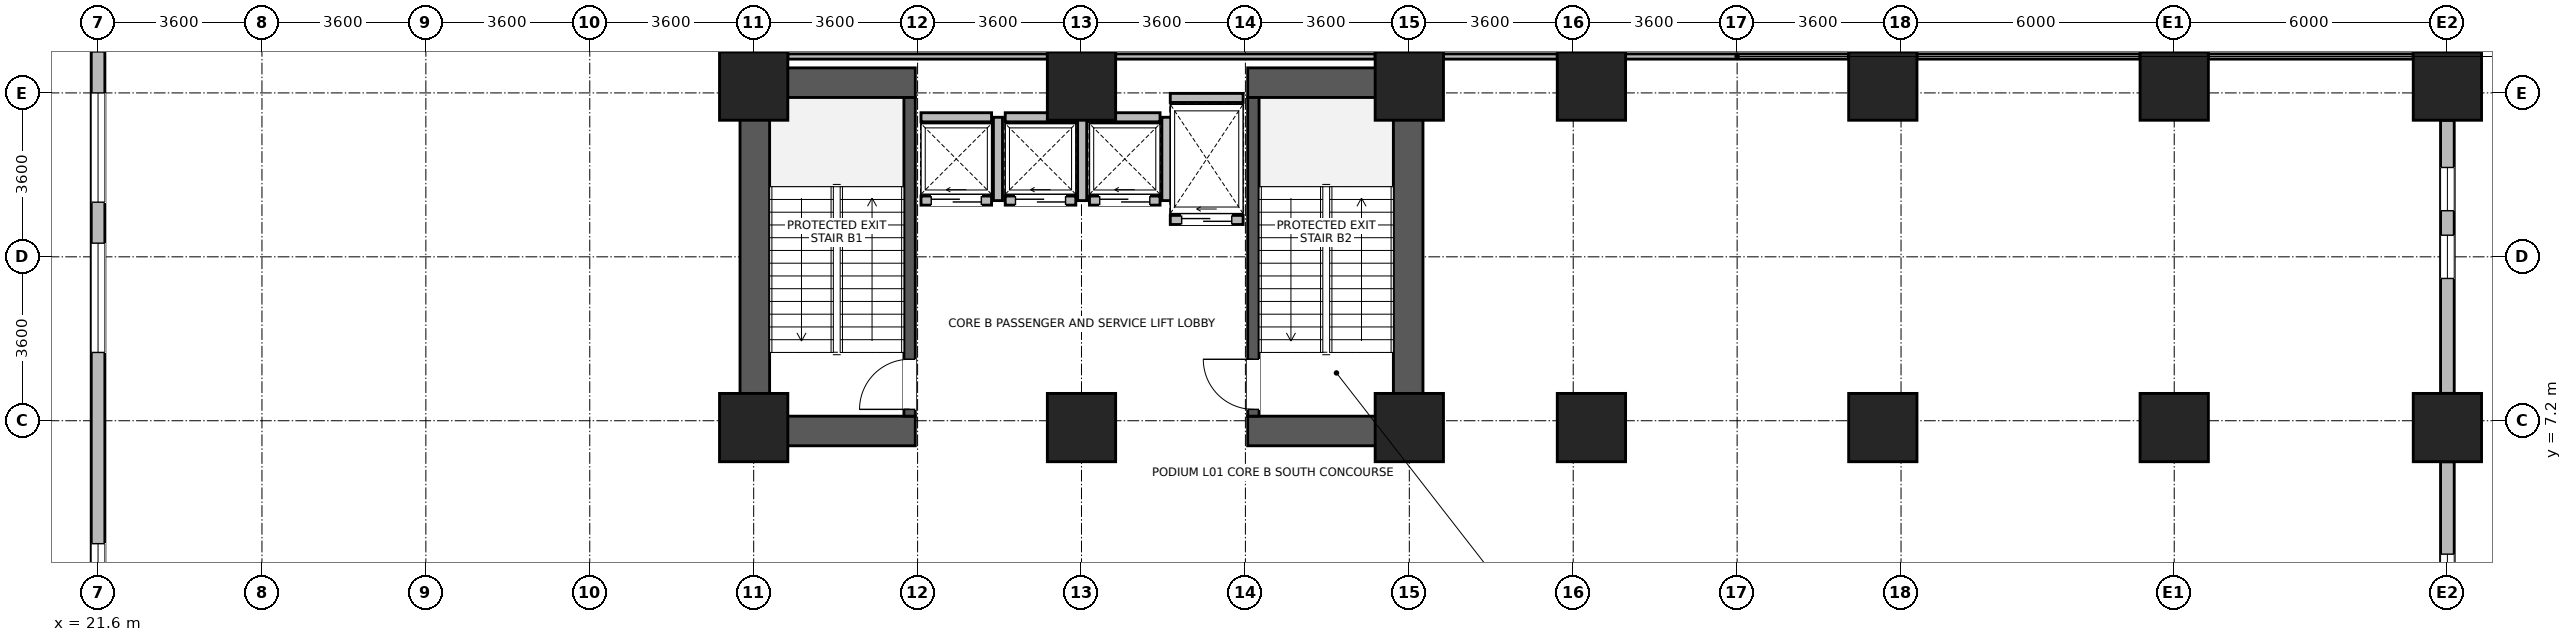
"""IFC4 building model, lengths in metres.
Left out: names, types, materials, properties, quantities, classifications, styles, units other than length and angle.
Written with IfcOpenShell. Run it as: python <this file> out.ifc"""

import sys

from ifc_helpers import new_model, si_unit, direction, frame, frame_2d, origin, origin_2d, place, context, subcontext, project, spatial, rectangle, extrude, source, transform, mapped, element, fill, save


model = new_model("IFC4")
c1 = context("Model", 3, precision=1e-05, world=origin(), true_north=direction((0.0, 1.0)))
c2 = subcontext(c1, "Body", "Model", "MODEL_VIEW")
j1 = project(units=[si_unit("LENGTHUNIT", "METRE"), si_unit("PLANEANGLEUNIT", "RADIAN")], contexts=[c1])
p1 = place(None, origin())
s1 = spatial("IfcSite", under=j1, at=p1, CompositionType="ELEMENT")
p2 = place(p1, origin())
s2 = spatial("IfcBuilding", under=s1, at=p2, CompositionType="ELEMENT")
p3 = place(p2, frame((0.0, 0.0, 5.4)))
s3 = spatial("IfcBuildingStorey", under=s2, at=p3, CompositionType="ELEMENT", Elevation=5.4)
for number, where, z_axis, x_axis in (
    (1, (36.025, 6.65, 0.0), (0.0, 0.0, 1.0), (0.0, 1.0, 0.0)),
    (2, (50.375, 6.65, 0.0), (0.0, 0.0, 1.0), (0.0, 1.0, 0.0)),
):
    element("IfcWall", number, at=place(p3, frame(where, z_axis=z_axis, x_axis=x_axis)), inside=s3, PredefinedType="SHEAR", context=c2, shape_type="SweptSolid", body=[
        extrude(rectangle(XDim=8.3, YDim=0.65, at=frame_2d((4.15, 0.0))), origin(), (0.0, 0.0, 1.0), 4.52),
    ])
for number, where, z_axis, x_axis in (
    (3, (36.35, 6.975, 0.0), (0.0, 0.0, 1.0), (1.0, 0.0, 0.0)),
    (4, (46.85, 6.975, 0.0), (0.0, 0.0, 1.0), (1.0, 0.0, 0.0)),
    (5, (36.35, 14.625, 0.0), (0.0, 0.0, 1.0), (1.0, 0.0, 0.0)),
    (6, (46.85, 14.625, 0.0), (0.0, 0.0, 1.0), (1.0, 0.0, 0.0)),
):
    element("IfcWall", number, at=place(p3, frame(where, z_axis=z_axis, x_axis=x_axis)), inside=s3, PredefinedType="SHEAR", context=c2, shape_type="SweptSolid", body=[
        extrude(rectangle(XDim=3.2, YDim=0.65, at=frame_2d((1.6, 0.0))), origin(), (0.0, 0.0, 1.0), 4.52),
    ])
p4 = place(p3, frame((39.425, 7.3, 0.0), z_axis=(0.0, 0.0, 1.0), x_axis=(0.0, 1.0, 0.0)))
e7 = element("IfcWall", 7, at=p4, inside=s3, PredefinedType="SHEAR", context=c2, shape_type="SweptSolid", body=[
    extrude(rectangle(XDim=7.0, YDim=0.25, at=frame_2d((3.5, 0.0))), origin(), (0.0, 0.0, 1.0), 4.52),
])
p5 = place(p4, frame((0.15, 0.0, 0.0)))
e8 = element("IfcOpeningElement", 8, at=p5, cuts=e7, PredefinedType="OPENING", context=c2, shape_type="SweptSolid", body=[
    extrude(rectangle(XDim=1.1, YDim=2.08, at=frame_2d((0.55, 1.04))), frame((0.0, 0.135, 0.0), z_axis=(0.0, -1.0, 0.0), x_axis=(1.0, 0.0, 0.0)), (0.0, 0.0, 1.0), 0.27),
])
p6 = place(p3, frame((46.975, 7.3, 0.0), z_axis=(0.0, 0.0, 1.0), x_axis=(0.0, 1.0, 0.0)))
e9 = element("IfcWall", 9, at=p6, inside=s3, PredefinedType="SHEAR", context=c2, shape_type="SweptSolid", body=[
    extrude(rectangle(XDim=7.0, YDim=0.25, at=frame_2d((3.5, 0.0))), origin(), (0.0, 0.0, 1.0), 4.52),
])
p7 = place(p6, frame((0.15, 0.0, 0.0)))
e10 = element("IfcOpeningElement", 10, at=p7, cuts=e9, PredefinedType="OPENING", context=c2, shape_type="SweptSolid", body=[
    extrude(rectangle(XDim=1.1, YDim=2.08, at=frame_2d((0.55, 1.04))), frame((0.0, 0.135, 0.0), z_axis=(0.0, -1.0, 0.0), x_axis=(1.0, 0.0, 0.0)), (0.0, 0.0, 1.0), 0.27),
])
m1 = source(origin(), c2, "Body", "SweptSolid", [
    extrude(rectangle(XDim=1.5, YDim=1.5, at=origin_2d()), origin(), (0.0, 0.0, 1.0), 4.8),
])
for number, where, z_axis, x_axis in (
    (11, (36.0, 7.05, 0.0), (0.0, 0.0, 1.0), (1.0, 0.0, 0.0)),
    (12, (36.0, 14.55, 0.0), (0.0, 0.0, 1.0), (1.0, 0.0, 0.0)),
    (13, (43.2, 7.05, 0.0), (0.0, 0.0, 1.0), (1.0, 0.0, 0.0)),
    (14, (43.2, 14.55, 0.0), (0.0, 0.0, 1.0), (1.0, 0.0, 0.0)),
    (15, (50.4, 7.05, 0.0), (0.0, 0.0, 1.0), (1.0, 0.0, 0.0)),
    (16, (50.4, 14.55, 0.0), (0.0, 0.0, 1.0), (1.0, 0.0, 0.0)),
    (17, (54.4, 7.05, 0.0), (0.0, 0.0, 1.0), (1.0, 0.0, 0.0)),
    (18, (54.4, 14.55, 0.0), (0.0, 0.0, 1.0), (1.0, 0.0, 0.0)),
    (19, (60.8, 14.55, 0.0), (0.0, 0.0, 1.0), (1.0, 0.0, 0.0)),
    (20, (60.8, 7.05, 0.0), (0.0, 0.0, 1.0), (1.0, 0.0, 0.0)),
    (21, (67.2, 7.05, 0.0), (0.0, 0.0, 1.0), (1.0, 0.0, 0.0)),
    (22, (67.2, 14.55, 0.0), (0.0, 0.0, 1.0), (1.0, 0.0, 0.0)),
    (23, (73.2, 7.05, 0.0), (0.0, 0.0, 1.0), (1.0, 0.0, 0.0)),
    (24, (73.2, 14.55, 0.0), (0.0, 0.0, 1.0), (1.0, 0.0, 0.0)),
):
    element("IfcColumn", number, at=place(p3, frame(where, z_axis=z_axis, x_axis=x_axis)), inside=s3, PredefinedType="COLUMN", context=c2, shape_type="MappedRepresentation", body=[
        mapped(m1, transform((0.0, 0.0, 0.0), x_axis=(1.0, 0.0, 0.0), y_axis=(0.0, 1.0, 0.0), z_axis=(0.0, 0.0, 1.0), scale=1.0)),
    ])
p8 = place(p3, frame((73.2, 6.299, 0.0), z_axis=(0.0, 0.0, 1.0), x_axis=(0.0, -1.0, 0.0)))
e25 = element("IfcWall", 25, at=p8, inside=s3, PredefinedType="STANDARD", context=c2, shape_type="SweptSolid", body=[
    extrude(rectangle(XDim=3.348, YDim=0.3, at=frame_2d((1.674, 0.0))), origin(), (0.0, 0.0, 1.0), 3.9),
])
p9 = place(p8, frame((2.029, 0.0, 0.9)))
e26 = element("IfcOpeningElement", 26, at=p9, cuts=e25, PredefinedType="OPENING", context=c2, shape_type="SweptSolid", body=[
    extrude(rectangle(XDim=0.95, YDim=1.75, at=frame_2d((0.475, 0.875))), frame((0.0, 0.16, 0.0), z_axis=(0.0, -1.0, 0.0), x_axis=(1.0, 0.0, 0.0)), (0.0, 0.0, 1.0), 0.32),
])
p10 = place(p3, frame((73.2, 13.799, 0.0), z_axis=(0.0, 0.0, 1.0), x_axis=(0.0, -1.0, 0.0)))
e27 = element("IfcWall", 27, at=p10, inside=s3, PredefinedType="STANDARD", context=c2, shape_type="SweptSolid", body=[
    extrude(rectangle(XDim=5.998, YDim=0.3, at=frame_2d((2.999, 0.0))), origin(), (0.0, 0.0, 1.0), 3.9),
])
p11 = place(p10, frame((2.524, 0.0, 0.9)))
e28 = element("IfcOpeningElement", 28, at=p11, cuts=e27, PredefinedType="OPENING", context=c2, shape_type="SweptSolid", body=[
    extrude(rectangle(XDim=0.95, YDim=1.75, at=frame_2d((0.475, 0.875))), frame((0.0, 0.16, 0.0), z_axis=(0.0, -1.0, 0.0), x_axis=(1.0, 0.0, 0.0)), (0.0, 0.0, 1.0), 0.32),
])
p12 = place(p10, frame((1.037, 0.0, 0.9)))
e29 = element("IfcOpeningElement", 29, at=p12, cuts=e27, PredefinedType="OPENING", context=c2, shape_type="SweptSolid", body=[
    extrude(rectangle(XDim=0.95, YDim=1.75, at=frame_2d((0.475, 0.875))), frame((0.0, 0.16, 0.0), z_axis=(0.0, -1.0, 0.0), x_axis=(1.0, 0.0, 0.0)), (0.0, 0.0, 1.0), 0.32),
])
p13 = place(p3, frame((21.6, 1.65, 0.0), z_axis=(0.0, 0.0, 1.0), x_axis=(0.0, 1.0, 0.0)))
e30 = element("IfcWall", 30, at=p13, inside=s3, PredefinedType="STANDARD", context=c2, shape_type="SweptSolid", body=[
    extrude(rectangle(XDim=16.5, YDim=0.3, at=frame_2d((8.25, 0.0))), origin(), (0.0, 0.0, 1.0), 4.5),
])
p14 = place(p13, frame((0.45, 0.0, 0.9)))
e31 = element("IfcOpeningElement", 31, at=p14, cuts=e30, PredefinedType="OPENING", context=c2, shape_type="SweptSolid", body=[
    extrude(rectangle(XDim=2.4, YDim=2.5, at=frame_2d((1.2, 1.25))), frame((0.0, 0.16, 0.0), z_axis=(0.0, -1.0, 0.0), x_axis=(1.0, 0.0, 0.0)), (0.0, 0.0, 1.0), 0.32),
])
p15 = place(p13, frame((7.05, 0.0, 0.9)))
e32 = element("IfcOpeningElement", 32, at=p15, cuts=e30, PredefinedType="OPENING", context=c2, shape_type="SweptSolid", body=[
    extrude(rectangle(XDim=2.4, YDim=2.5, at=frame_2d((1.2, 1.25))), frame((0.0, 0.16, 0.0), z_axis=(0.0, -1.0, 0.0), x_axis=(1.0, 0.0, 0.0)), (0.0, 0.0, 1.0), 0.32),
])
p16 = place(p13, frame((10.35, 0.0, 0.9)))
e33 = element("IfcOpeningElement", 33, at=p16, cuts=e30, PredefinedType="OPENING", context=c2, shape_type="SweptSolid", body=[
    extrude(rectangle(XDim=2.4, YDim=2.5, at=frame_2d((1.2, 1.25))), frame((0.0, 0.16, 0.0), z_axis=(0.0, -1.0, 0.0), x_axis=(1.0, 0.0, 0.0)), (0.0, 0.0, 1.0), 0.32),
])
p17 = place(p13, frame((13.65, 0.0, 0.9)))
e34 = element("IfcOpeningElement", 34, at=p17, cuts=e30, PredefinedType="OPENING", context=c2, shape_type="SweptSolid", body=[
    extrude(rectangle(XDim=2.4, YDim=2.5, at=frame_2d((1.2, 1.25))), frame((0.0, 0.16, 0.0), z_axis=(0.0, -1.0, 0.0), x_axis=(1.0, 0.0, 0.0)), (0.0, 0.0, 1.0), 0.32),
])
p18 = place(p3, frame((39.675, 12.035, 0.0), z_axis=(0.0, 0.0, 1.0), x_axis=(1.0, 0.0, 0.0)))
e35 = element("IfcWall", 35, at=p18, inside=s3, PredefinedType="PARTITIONING", context=c2, shape_type="SweptSolid", body=[
    extrude(rectangle(XDim=1.55, YDim=0.2, at=frame_2d((0.775, 0.0))), origin(), (0.0, 0.0, 1.0), 4.5),
])
p19 = place(p18, frame((0.225, 0.0, 0.0)))
e36 = element("IfcOpeningElement", 36, at=p19, cuts=e35, PredefinedType="OPENING", context=c2, shape_type="SweptSolid", body=[
    extrude(rectangle(XDim=1.1, YDim=2.12, at=frame_2d((0.55, 1.06))), frame((0.0, 0.11, 0.0), z_axis=(0.0, -1.0, 0.0), x_axis=(1.0, 0.0, 0.0)), (0.0, 0.0, 1.0), 0.22),
])
p20 = place(p3, frame((39.675, 13.865, 0.0), z_axis=(0.0, 0.0, 1.0), x_axis=(1.0, 0.0, 0.0)))
e37 = element("IfcWall", 37, at=p20, inside=s3, PredefinedType="PARTITIONING", context=c2, shape_type="SweptSolid", body=[
    extrude(rectangle(XDim=1.55, YDim=0.2, at=frame_2d((0.775, 0.0))), origin(), (0.0, 0.0, 1.0), 4.5),
])
p21 = place(p3, frame((41.365, 12.035, 0.0), z_axis=(0.0, 0.0, 1.0), x_axis=(0.0, 1.0, 0.0)))
e38 = element("IfcWall", 38, at=p21, inside=s3, PredefinedType="PARTITIONING", context=c2, shape_type="SweptSolid", body=[
    extrude(rectangle(XDim=1.83, YDim=0.2, at=frame_2d((0.915, 0.0))), origin(), (0.0, 0.0, 1.0), 4.5),
])
p22 = place(p3, frame((41.525, 12.035, 0.0), z_axis=(0.0, 0.0, 1.0), x_axis=(1.0, 0.0, 0.0)))
e39 = element("IfcWall", 39, at=p22, inside=s3, PredefinedType="PARTITIONING", context=c2, shape_type="SweptSolid", body=[
    extrude(rectangle(XDim=1.55, YDim=0.2, at=frame_2d((0.775, 0.0))), origin(), (0.0, 0.0, 1.0), 4.5),
])
p23 = place(p22, frame((0.225, 0.0, 0.0)))
e40 = element("IfcOpeningElement", 40, at=p23, cuts=e39, PredefinedType="OPENING", context=c2, shape_type="SweptSolid", body=[
    extrude(rectangle(XDim=1.1, YDim=2.12, at=frame_2d((0.55, 1.06))), frame((0.0, 0.11, 0.0), z_axis=(0.0, -1.0, 0.0), x_axis=(1.0, 0.0, 0.0)), (0.0, 0.0, 1.0), 0.22),
])
p24 = place(p3, frame((41.525, 13.865, 0.0), z_axis=(0.0, 0.0, 1.0), x_axis=(1.0, 0.0, 0.0)))
e41 = element("IfcWall", 41, at=p24, inside=s3, PredefinedType="PARTITIONING", context=c2, shape_type="SweptSolid", body=[
    extrude(rectangle(XDim=1.55, YDim=0.2, at=frame_2d((0.775, 0.0))), origin(), (0.0, 0.0, 1.0), 4.5),
])
p25 = place(p3, frame((43.215, 12.035, 0.0), z_axis=(0.0, 0.0, 1.0), x_axis=(0.0, 1.0, 0.0)))
e42 = element("IfcWall", 42, at=p25, inside=s3, PredefinedType="PARTITIONING", context=c2, shape_type="SweptSolid", body=[
    extrude(rectangle(XDim=1.83, YDim=0.2, at=frame_2d((0.915, 0.0))), origin(), (0.0, 0.0, 1.0), 4.5),
])
p26 = place(p3, frame((43.375, 12.035, 0.0), z_axis=(0.0, 0.0, 1.0), x_axis=(1.0, 0.0, 0.0)))
e43 = element("IfcWall", 43, at=p26, inside=s3, PredefinedType="PARTITIONING", context=c2, shape_type="SweptSolid", body=[
    extrude(rectangle(XDim=1.55, YDim=0.2, at=frame_2d((0.775, 0.0))), origin(), (0.0, 0.0, 1.0), 4.5),
])
p27 = place(p26, frame((0.225, 0.0, 0.0)))
e44 = element("IfcOpeningElement", 44, at=p27, cuts=e43, PredefinedType="OPENING", context=c2, shape_type="SweptSolid", body=[
    extrude(rectangle(XDim=1.1, YDim=2.12, at=frame_2d((0.55, 1.06))), frame((0.0, 0.11, 0.0), z_axis=(0.0, -1.0, 0.0), x_axis=(1.0, 0.0, 0.0)), (0.0, 0.0, 1.0), 0.22),
])
p28 = place(p3, frame((43.375, 13.865, 0.0), z_axis=(0.0, 0.0, 1.0), x_axis=(1.0, 0.0, 0.0)))
e45 = element("IfcWall", 45, at=p28, inside=s3, PredefinedType="PARTITIONING", context=c2, shape_type="SweptSolid", body=[
    extrude(rectangle(XDim=1.55, YDim=0.2, at=frame_2d((0.775, 0.0))), origin(), (0.0, 0.0, 1.0), 4.5),
])
p29 = place(p3, frame((45.065, 12.035, 0.0), z_axis=(0.0, 0.0, 1.0), x_axis=(0.0, 1.0, 0.0)))
e46 = element("IfcWall", 46, at=p29, inside=s3, PredefinedType="PARTITIONING", context=c2, shape_type="SweptSolid", body=[
    extrude(rectangle(XDim=1.83, YDim=0.2, at=frame_2d((0.915, 0.0))), origin(), (0.0, 0.0, 1.0), 4.5),
])
p30 = place(p3, frame((45.15, 11.61, 0.0), z_axis=(0.0, 0.0, 1.0), x_axis=(1.0, 0.0, 0.0)))
e47 = element("IfcWall", 47, at=p30, inside=s3, PredefinedType="PARTITIONING", context=c2, shape_type="SweptSolid", body=[
    extrude(rectangle(XDim=1.6, YDim=0.2, at=frame_2d((0.8, 0.0))), origin(), (0.0, 0.0, 1.0), 4.5),
])
p31 = place(p30, frame((0.25, 0.0, 0.0)))
e48 = element("IfcOpeningElement", 48, at=p31, cuts=e47, PredefinedType="OPENING", context=c2, shape_type="SweptSolid", body=[
    extrude(rectangle(XDim=1.1, YDim=2.12, at=frame_2d((0.55, 1.06))), frame((0.0, 0.11, 0.0), z_axis=(0.0, -1.0, 0.0), x_axis=(1.0, 0.0, 0.0)), (0.0, 0.0, 1.0), 0.22),
])
p32 = place(p3, frame((45.15, 14.29, 0.0), z_axis=(0.0, 0.0, 1.0), x_axis=(1.0, 0.0, 0.0)))
e49 = element("IfcWall", 49, at=p32, inside=s3, PredefinedType="PARTITIONING", context=c2, shape_type="SweptSolid", body=[
    extrude(rectangle(XDim=1.6, YDim=0.2, at=frame_2d((0.8, 0.0))), origin(), (0.0, 0.0, 1.0), 3.3),
])
p33 = place(p3, frame((35.4, 15.3, 0.0), z_axis=(0.0, 0.0, 1.0), x_axis=(0.0, 1.0, 0.0)))
e50 = element("IfcWall", 50, at=p33, inside=s3, PredefinedType="PARTITIONING", context=c2, shape_type="SweptSolid", body=[
    extrude(rectangle(XDim=5.55, YDim=0.15, at=frame_2d((2.775, 0.0))), origin(), (0.0, 0.0, 1.0), 4.5),
])
for number, where, z_axis, x_axis in (
    (51, (36.75, 15.2, 0.0), (0.0, 0.0, 1.0), (1.0, 0.0, 0.0)),
    (52, (43.95, 15.2, 0.0), (0.0, 0.0, 1.0), (1.0, 0.0, 0.0)),
):
    element("IfcWall", number, at=place(p3, frame(where, z_axis=z_axis, x_axis=x_axis)), inside=s3, PredefinedType="PARTITIONING", context=c2, shape_type="SweptSolid", body=[
        extrude(rectangle(XDim=5.7, YDim=0.115, at=frame_2d((2.85, 0.0))), origin(), (0.0, 0.0, 1.0), 4.5),
    ])
p34 = place(p3, frame((51.15, 15.2, 0.0), z_axis=(0.0, 0.0, 1.0), x_axis=(1.0, 0.0, 0.0)))
e53 = element("IfcWall", 53, at=p34, inside=s3, PredefinedType="PARTITIONING", context=c2, shape_type="SweptSolid", body=[
    extrude(rectangle(XDim=2.5, YDim=0.115, at=frame_2d((1.25, 0.0))), origin(), (0.0, 0.0, 1.0), 4.5),
])
p35 = place(p3, frame((55.15, 15.2, 0.0), z_axis=(0.0, 0.0, 1.0), x_axis=(1.0, 0.0, 0.0)))
e54 = element("IfcWall", 54, at=p35, inside=s3, PredefinedType="PARTITIONING", context=c2, shape_type="SweptSolid", body=[
    extrude(rectangle(XDim=4.9, YDim=0.115, at=frame_2d((2.45, 0.0))), origin(), (0.0, 0.0, 1.0), 4.5),
])
p36 = place(p3, frame((61.55, 15.2, 0.0), z_axis=(0.0, 0.0, 1.0), x_axis=(1.0, 0.0, 0.0)))
e55 = element("IfcWall", 55, at=p36, inside=s3, PredefinedType="PARTITIONING", context=c2, shape_type="SweptSolid", body=[
    extrude(rectangle(XDim=4.9, YDim=0.115, at=frame_2d((2.45, 0.0))), origin(), (0.0, 0.0, 1.0), 4.5),
])
p37 = place(p3, frame((67.95, 15.2, 0.0), z_axis=(0.0, 0.0, 1.0), x_axis=(1.0, 0.0, 0.0)))
e56 = element("IfcWall", 56, at=p37, inside=s3, PredefinedType="PARTITIONING", context=c2, shape_type="SweptSolid", body=[
    extrude(rectangle(XDim=4.5, YDim=0.115, at=frame_2d((2.25, 0.0))), origin(), (0.0, 0.0, 1.0), 4.5),
])
p38 = place(p9, origin())
e57 = element("IfcWindow", 57, at=p38, inside=s3, PartitioningType="SINGLE_PANEL", PredefinedType="WINDOW", context=c2, shape_type="SweptSolid", body=[
    extrude(rectangle(XDim=0.95, YDim=1.75, at=frame_2d((0.475, 0.875))), frame((0.0, 0.03, 0.0), z_axis=(0.0, -1.0, 0.0), x_axis=(1.0, 0.0, 0.0)), (0.0, 0.0, 1.0), 0.06),
])
fill(e26, e57)
p39 = place(p11, origin())
e58 = element("IfcWindow", 58, at=p39, inside=s3, PartitioningType="SINGLE_PANEL", PredefinedType="WINDOW", context=c2, shape_type="SweptSolid", body=[
    extrude(rectangle(XDim=0.95, YDim=1.75, at=frame_2d((0.475, 0.875))), frame((0.0, 0.03, 0.0), z_axis=(0.0, -1.0, 0.0), x_axis=(1.0, 0.0, 0.0)), (0.0, 0.0, 1.0), 0.06),
])
fill(e28, e58)
p40 = place(p12, origin())
e59 = element("IfcWindow", 59, at=p40, inside=s3, PartitioningType="SINGLE_PANEL", PredefinedType="WINDOW", context=c2, shape_type="SweptSolid", body=[
    extrude(rectangle(XDim=0.95, YDim=1.75, at=frame_2d((0.475, 0.875))), frame((0.0, 0.03, 0.0), z_axis=(0.0, -1.0, 0.0), x_axis=(1.0, 0.0, 0.0)), (0.0, 0.0, 1.0), 0.06),
])
fill(e29, e59)
p41 = place(p14, origin())
e60 = element("IfcWindow", 60, at=p41, inside=s3, PartitioningType="SINGLE_PANEL", PredefinedType="WINDOW", context=c2, shape_type="SweptSolid", body=[
    extrude(rectangle(XDim=2.4, YDim=2.5, at=frame_2d((1.2, 1.25))), frame((0.0, 0.03, 0.0), z_axis=(0.0, -1.0, 0.0), x_axis=(1.0, 0.0, 0.0)), (0.0, 0.0, 1.0), 0.06),
])
fill(e31, e60)
p42 = place(p15, origin())
e61 = element("IfcWindow", 61, at=p42, inside=s3, PartitioningType="SINGLE_PANEL", PredefinedType="WINDOW", context=c2, shape_type="SweptSolid", body=[
    extrude(rectangle(XDim=2.4, YDim=2.5, at=frame_2d((1.2, 1.25))), frame((0.0, 0.03, 0.0), z_axis=(0.0, -1.0, 0.0), x_axis=(1.0, 0.0, 0.0)), (0.0, 0.0, 1.0), 0.06),
])
fill(e32, e61)
p43 = place(p16, origin())
e62 = element("IfcWindow", 62, at=p43, inside=s3, PartitioningType="SINGLE_PANEL", PredefinedType="WINDOW", context=c2, shape_type="SweptSolid", body=[
    extrude(rectangle(XDim=2.4, YDim=2.5, at=frame_2d((1.2, 1.25))), frame((0.0, 0.03, 0.0), z_axis=(0.0, -1.0, 0.0), x_axis=(1.0, 0.0, 0.0)), (0.0, 0.0, 1.0), 0.06),
])
fill(e33, e62)
p44 = place(p17, origin())
e63 = element("IfcWindow", 63, at=p44, inside=s3, PartitioningType="SINGLE_PANEL", PredefinedType="WINDOW", context=c2, shape_type="SweptSolid", body=[
    extrude(rectangle(XDim=2.4, YDim=2.5, at=frame_2d((1.2, 1.25))), frame((0.0, 0.03, 0.0), z_axis=(0.0, -1.0, 0.0), x_axis=(1.0, 0.0, 0.0)), (0.0, 0.0, 1.0), 0.06),
])
fill(e34, e63)
p45 = place(p5, origin())
e64 = element("IfcDoor", 64, at=p45, inside=s3, OperationType="SINGLE_SWING_LEFT", PredefinedType="DOOR", context=c2, shape_type="SweptSolid", body=[
    extrude(rectangle(XDim=1.1, YDim=2.08, at=frame_2d((0.55, 1.04))), frame((0.0, 0.025, 0.0), z_axis=(0.0, -1.0, 0.0), x_axis=(1.0, 0.0, 0.0)), (0.0, 0.0, 1.0), 0.05),
])
fill(e8, e64)
p46 = place(p7, origin())
e65 = element("IfcDoor", 65, at=p46, inside=s3, OperationType="SINGLE_SWING_RIGHT", PredefinedType="DOOR", context=c2, shape_type="SweptSolid", body=[
    extrude(rectangle(XDim=1.1, YDim=2.08, at=frame_2d((0.55, 1.04))), frame((0.0, 0.025, 0.0), z_axis=(0.0, -1.0, 0.0), x_axis=(1.0, 0.0, 0.0)), (0.0, 0.0, 1.0), 0.05),
])
fill(e10, e65)
p47 = place(p19, origin())
e66 = element("IfcDoor", 66, at=p47, inside=s3, OperationType="SLIDING_TO_LEFT", PredefinedType="DOOR", context=c2, shape_type="SweptSolid", body=[
    extrude(rectangle(XDim=1.1, YDim=2.12, at=frame_2d((0.55, 1.06))), frame((0.0, 0.025, 0.0), z_axis=(0.0, -1.0, 0.0), x_axis=(1.0, 0.0, 0.0)), (0.0, 0.0, 1.0), 0.05),
])
fill(e36, e66)
p48 = place(p23, origin())
e67 = element("IfcDoor", 67, at=p48, inside=s3, OperationType="SLIDING_TO_LEFT", PredefinedType="DOOR", context=c2, shape_type="SweptSolid", body=[
    extrude(rectangle(XDim=1.1, YDim=2.12, at=frame_2d((0.55, 1.06))), frame((0.0, 0.025, 0.0), z_axis=(0.0, -1.0, 0.0), x_axis=(1.0, 0.0, 0.0)), (0.0, 0.0, 1.0), 0.05),
])
fill(e40, e67)
p49 = place(p27, origin())
e68 = element("IfcDoor", 68, at=p49, inside=s3, OperationType="SLIDING_TO_LEFT", PredefinedType="DOOR", context=c2, shape_type="SweptSolid", body=[
    extrude(rectangle(XDim=1.1, YDim=2.12, at=frame_2d((0.55, 1.06))), frame((0.0, 0.025, 0.0), z_axis=(0.0, -1.0, 0.0), x_axis=(1.0, 0.0, 0.0)), (0.0, 0.0, 1.0), 0.05),
])
fill(e44, e68)
p50 = place(p31, origin())
e69 = element("IfcDoor", 69, at=p50, inside=s3, OperationType="SLIDING_TO_LEFT", PredefinedType="DOOR", context=c2, shape_type="SweptSolid", body=[
    extrude(rectangle(XDim=1.1, YDim=2.12, at=frame_2d((0.55, 1.06))), frame((0.0, 0.025, 0.0), z_axis=(0.0, -1.0, 0.0), x_axis=(1.0, 0.0, 0.0)), (0.0, 0.0, 1.0), 0.05),
])
fill(e48, e69)
save(model, sys.argv[1])
